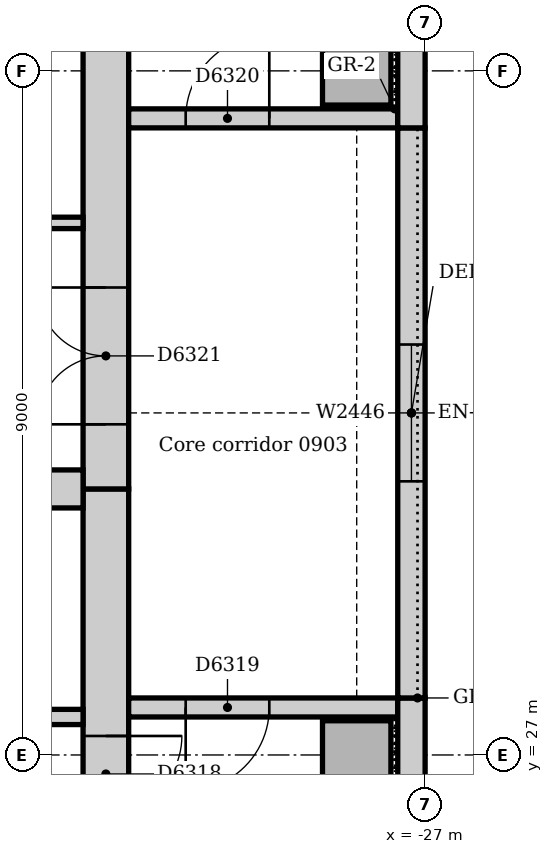
"""IFC4 building model, lengths in metres.
Left out: names, types, materials, properties, quantities, classifications, styles, units other than length and angle.
Written with IfcOpenShell. Run it as: python <this file> out.ifc"""

import sys

from ifc_helpers import new_model, si_unit, direction, frame, frame_2d, origin, origin_2d, place, context, subcontext, project, spatial, rectangle, extrude, element, fill, save


model = new_model("IFC4")
c1 = context("Model", 3, precision=1e-05, world=origin(), true_north=direction((0.0, 1.0)))
c2 = subcontext(c1, "Body", "Model", "MODEL_VIEW")
j1 = project(units=[si_unit("LENGTHUNIT", "METRE"), si_unit("PLANEANGLEUNIT", "RADIAN")], contexts=[c1])
p1 = place(None, origin())
s1 = spatial("IfcSite", under=j1, at=p1, CompositionType="ELEMENT")
p2 = place(p1, origin())
s2 = spatial("IfcBuilding", under=s1, at=p2, CompositionType="ELEMENT")
p3 = place(p2, frame((0.0, 0.0, 42.0)))
s3 = spatial("IfcBuildingStorey", under=s2, at=p3, CompositionType="ELEMENT", Elevation=42.0)
p4 = place(p3, frame((-31.2, 21.0, 0.0), z_axis=(0.0, 0.0, 1.0), x_axis=(0.0, 1.0, 0.0)))
e1 = element("IfcWall", 1, at=p4, inside=s3, PredefinedType="SOLIDWALL", context=c2, shape_type="SweptSolid", body=[
    extrude(rectangle(XDim=9.5, YDim=0.6, at=frame_2d((4.75, 0.0))), origin(), (0.0, 0.0, 1.0), 4.0),
])
p5 = place(p4, frame((5.25, 0.0, 0.0)))
e2 = element("IfcOpeningElement", 2, at=p5, cuts=e1, PredefinedType="OPENING", context=c2, shape_type="SweptSolid", body=[
    extrude(rectangle(XDim=1.0, YDim=2.1, at=frame_2d((0.5, 1.05))), frame((0.0, 0.31, 0.0), z_axis=(0.0, -1.0, 0.0), x_axis=(1.0, 0.0, 0.0)), (0.0, 0.0, 1.0), 0.62),
])
p6 = place(p3, frame((-31.2, 30.5, 0.0), z_axis=(0.0, 0.0, 1.0), x_axis=(0.0, 1.0, 0.0)))
e3 = element("IfcWall", 3, at=p6, inside=s3, PredefinedType="SOLIDWALL", context=c2, shape_type="SweptSolid", body=[
    extrude(rectangle(XDim=11.5, YDim=0.6, at=frame_2d((5.75, 0.0))), origin(), (0.0, 0.0, 1.0), 4.0),
])
p7 = place(p6, frame((0.85, 0.0, 0.0)))
e4 = element("IfcOpeningElement", 4, at=p7, cuts=e3, PredefinedType="OPENING", context=c2, shape_type="SweptSolid", body=[
    extrude(rectangle(XDim=1.8, YDim=2.1, at=frame_2d((0.9, 1.05))), frame((0.0, 0.31, 0.0), z_axis=(0.0, -1.0, 0.0), x_axis=(1.0, 0.0, 0.0)), (0.0, 0.0, 1.0), 0.62),
])
p8 = place(p3, frame((-42.0, 30.5, 0.0), z_axis=(0.0, 0.0, 1.0), x_axis=(1.0, 0.0, 0.0)))
e5 = element("IfcWall", 5, at=p8, inside=s3, PredefinedType="SOLIDWALL", context=c2, shape_type="SweptSolid", body=[
    extrude(rectangle(XDim=10.5, YDim=0.5, at=frame_2d((5.25, 0.0))), origin(), (0.0, 0.0, 1.0), 4.0),
])
p9 = place(p3, frame((-27.36, 27.625, 0.0), z_axis=(0.0, 0.0, 1.0), x_axis=(-1.0, 0.0, 0.0)))
e6 = element("IfcWall", 6, at=p9, inside=s3, PredefinedType="SOLIDWALL", context=c2, shape_type="SweptSolid", body=[
    extrude(rectangle(XDim=3.54, YDim=0.25, at=frame_2d((1.77, 0.0))), origin(), (0.0, 0.0, 1.0), 4.0),
])
p10 = place(p9, frame((1.69, 0.0, 0.0)))
e7 = element("IfcOpeningElement", 7, at=p10, cuts=e6, PredefinedType="OPENING", context=c2, shape_type="SweptSolid", body=[
    extrude(rectangle(XDim=1.1, YDim=2.1, at=frame_2d((0.55, 1.05))), frame((0.0, 0.135, 0.0), z_axis=(0.0, -1.0, 0.0), x_axis=(1.0, 0.0, 0.0)), (0.0, 0.0, 1.0), 0.27),
])
p11 = place(p3, frame((-30.9, 35.375, 0.0), z_axis=(0.0, 0.0, 1.0), x_axis=(1.0, 0.0, 0.0)))
e8 = element("IfcWall", 8, at=p11, inside=s3, PredefinedType="SOLIDWALL", context=c2, shape_type="SweptSolid", body=[
    extrude(rectangle(XDim=3.54, YDim=0.25, at=frame_2d((1.77, 0.0))), origin(), (0.0, 0.0, 1.0), 4.0),
])
p12 = place(p11, frame((0.75, 0.0, 0.0)))
e9 = element("IfcOpeningElement", 9, at=p12, cuts=e8, PredefinedType="OPENING", context=c2, shape_type="SweptSolid", body=[
    extrude(rectangle(XDim=1.1, YDim=2.1, at=frame_2d((0.55, 1.05))), frame((0.0, 0.135, 0.0), z_axis=(0.0, -1.0, 0.0), x_axis=(1.0, 0.0, 0.0)), (0.0, 0.0, 1.0), 0.27),
])
for number, where, z_axis, x_axis in (
    (10, (-27.9, 27.0, 0.0), (0.0, 0.0, 1.0), (1.0, 0.0, 0.0)),
    (11, (-27.9, 36.0, 0.0), (0.0, 0.0, 1.0), (1.0, 0.0, 0.0)),
):
    element("IfcColumn", number, at=place(p3, frame(where, z_axis=z_axis, x_axis=x_axis)), inside=s3, PredefinedType="COLUMN", context=c2, shape_type="SweptSolid", body=[
        extrude(rectangle(XDim=0.9, YDim=0.9, at=origin_2d()), origin(), (0.0, 0.0, 1.0), 4.0),
    ])
p13 = place(p3, frame((-27.18, 21.0, 0.0), z_axis=(0.0, 0.0, 1.0), x_axis=(0.0, 1.0, 0.0)))
e12 = element("IfcWall", 12, at=p13, inside=s3, PredefinedType="STANDARD", context=c2, shape_type="SweptSolid", body=[
    extrude(rectangle(XDim=6.75, YDim=0.36, at=frame_2d((3.375, 0.0))), origin(), (0.0, 0.0, 1.0), 3.7),
])
p14 = place(p3, frame((-27.18, 27.75, 0.0), z_axis=(0.0, 0.0, 1.0), x_axis=(0.0, 1.0, 0.0)))
e13 = element("IfcWall", 13, at=p14, inside=s3, PredefinedType="STANDARD", context=c2, shape_type="SweptSolid", body=[
    extrude(rectangle(XDim=7.5, YDim=0.36, at=frame_2d((3.75, 0.0))), origin(), (0.0, 0.0, 1.0), 3.7),
])
p15 = place(p14, frame((2.85, 0.0, 1.2)))
e14 = element("IfcOpeningElement", 14, at=p15, cuts=e13, PredefinedType="OPENING", context=c2, shape_type="SweptSolid", body=[
    extrude(rectangle(XDim=1.8, YDim=1.2, at=frame_2d((0.9, 0.6))), frame((0.0, 0.19, 0.0), z_axis=(0.0, -1.0, 0.0), x_axis=(1.0, 0.0, 0.0)), (0.0, 0.0, 1.0), 0.38),
])
p16 = place(p3, frame((-27.18, 35.25, 0.0), z_axis=(0.0, 0.0, 1.0), x_axis=(0.0, 1.0, 0.0)))
e15 = element("IfcWall", 15, at=p16, inside=s3, PredefinedType="STANDARD", context=c2, shape_type="SweptSolid", body=[
    extrude(rectangle(XDim=5.507, YDim=0.36, at=frame_2d((2.754, 0.0))), origin(), (0.0, 0.0, 1.0), 3.7),
])
p17 = place(p3, frame((-34.9, 27.5, 0.0), z_axis=(0.0, 0.0, 1.0), x_axis=(1.0, 0.0, 0.0)))
e16 = element("IfcWall", 16, at=p17, inside=s3, PredefinedType="SOLIDWALL", context=c2, shape_type="SweptSolid", body=[
    extrude(rectangle(XDim=3.4, YDim=0.2, at=frame_2d((1.7, 0.0))), origin(), (0.0, 0.0, 1.0), 4.0),
])
p18 = place(p17, frame((1.1, 0.0, 0.0)))
e17 = element("IfcOpeningElement", 17, at=p18, cuts=e16, PredefinedType="OPENING", context=c2, shape_type="SweptSolid", body=[
    extrude(rectangle(XDim=1.1, YDim=2.1, at=frame_2d((0.55, 1.05))), frame((0.0, 0.11, 0.0), z_axis=(0.0, -1.0, 0.0), x_axis=(1.0, 0.0, 0.0)), (0.0, 0.0, 1.0), 0.22),
])
p19 = place(p3, frame((-34.075, 34.0, 0.0), z_axis=(0.0, 0.0, 1.0), x_axis=(1.0, 0.0, 0.0)))
e18 = element("IfcWall", 18, at=p19, inside=s3, PredefinedType="SOLIDWALL", context=c2, shape_type="SweptSolid", body=[
    extrude(rectangle(XDim=2.575, YDim=0.15, at=frame_2d((1.288, 0.0))), origin(), (0.0, 0.0, 1.0), 4.0),
])
p20 = place(p15, origin())
e19 = element("IfcWindow", 19, at=p20, inside=s3, PartitioningType="SINGLE_PANEL", PredefinedType="WINDOW", context=c2, shape_type="SweptSolid", body=[
    extrude(rectangle(XDim=1.8, YDim=1.2, at=frame_2d((0.9, 0.6))), frame((0.0, 0.13, 0.0), z_axis=(0.0, -1.0, 0.0), x_axis=(1.0, 0.0, 0.0)), (0.0, 0.0, 1.0), 0.06),
])
fill(e14, e19)
p21 = place(p5, frame((1.0, 0.0, 0.0), z_axis=(0.0, 0.0, 1.0), x_axis=(-1.0, 0.0, 0.0)))
e20 = element("IfcDoor", 20, at=p21, inside=s3, OperationType="SINGLE_SWING_LEFT", PredefinedType="DOOR", context=c2, shape_type="SweptSolid", body=[
    extrude(rectangle(XDim=1.0, YDim=2.1, at=frame_2d((0.5, 1.05))), frame((0.0, 0.025, 0.0), z_axis=(0.0, -1.0, 0.0), x_axis=(1.0, 0.0, 0.0)), (0.0, 0.0, 1.0), 0.05),
])
fill(e2, e20)
p22 = place(p10, origin())
e21 = element("IfcDoor", 21, at=p22, inside=s3, OperationType="SINGLE_SWING_RIGHT", PredefinedType="DOOR", context=c2, shape_type="SweptSolid", body=[
    extrude(rectangle(XDim=1.1, YDim=2.1, at=frame_2d((0.55, 1.05))), frame((0.0, 0.025, 0.0), z_axis=(0.0, -1.0, 0.0), x_axis=(1.0, 0.0, 0.0)), (0.0, 0.0, 1.0), 0.05),
])
fill(e7, e21)
p23 = place(p12, origin())
e22 = element("IfcDoor", 22, at=p23, inside=s3, OperationType="SINGLE_SWING_RIGHT", PredefinedType="DOOR", context=c2, shape_type="SweptSolid", body=[
    extrude(rectangle(XDim=1.1, YDim=2.1, at=frame_2d((0.55, 1.05))), frame((0.0, 0.025, 0.0), z_axis=(0.0, -1.0, 0.0), x_axis=(1.0, 0.0, 0.0)), (0.0, 0.0, 1.0), 0.05),
])
fill(e9, e22)
p24 = place(p7, origin())
e23 = element("IfcDoor", 23, at=p24, inside=s3, OperationType="DOUBLE_DOOR_SINGLE_SWING", PredefinedType="DOOR", context=c2, shape_type="SweptSolid", body=[
    extrude(rectangle(XDim=1.8, YDim=2.1, at=frame_2d((0.9, 1.05))), frame((0.0, 0.025, 0.0), z_axis=(0.0, -1.0, 0.0), x_axis=(1.0, 0.0, 0.0)), (0.0, 0.0, 1.0), 0.05),
])
fill(e4, e23)
save(model, sys.argv[1])
